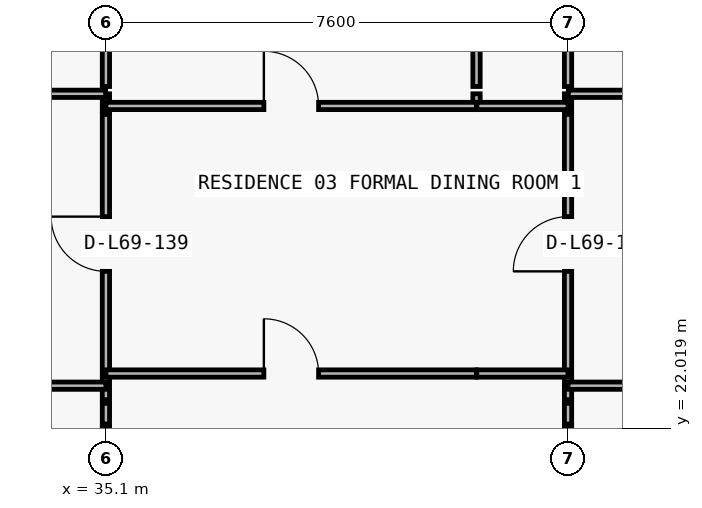
"""IFC4 building model, lengths in metres.
Left out: names, types, materials, properties, quantities, classifications, styles, units other than length and angle.
Written with IfcOpenShell. Run it as: python <this file> out.ifc"""

import sys

from ifc_helpers import new_model, si_unit, direction, frame, frame_2d, origin, place, context, subcontext, project, spatial, rectangle, extrude, element, fill, save


model = new_model("IFC4")
c1 = context("Model", 3, precision=1e-05, world=origin(), true_north=direction((0.0, 1.0)))
c2 = subcontext(c1, "Body", "Model", "MODEL_VIEW")
j1 = project(units=[si_unit("LENGTHUNIT", "METRE"), si_unit("PLANEANGLEUNIT", "RADIAN")], contexts=[c1])
p1 = place(None, origin())
s1 = spatial("IfcSite", under=j1, at=p1, CompositionType="ELEMENT")
p2 = place(p1, origin())
s2 = spatial("IfcBuilding", under=s1, at=p2, CompositionType="ELEMENT")
p3 = place(p2, frame((0.0, 0.0, 246.3)))
s3 = spatial("IfcBuildingStorey", under=s2, at=p3, CompositionType="ELEMENT", Elevation=246.3)
p4 = place(p3, frame((35.1, 22.09, 0.0), z_axis=(0.0, 0.0, 1.0), x_axis=(0.0, 1.0, 0.0)))
e1 = element("IfcWall", 1, at=p4, inside=s3, PredefinedType="PARTITIONING", context=c2, shape_type="SweptSolid", body=[
    extrude(rectangle(XDim=0.34, YDim=0.12, at=frame_2d((0.17, 0.0))), origin(), (0.0, 0.0, 1.0), 2.263),
])
p5 = place(p3, frame((35.1, 22.49, 0.0), z_axis=(0.0, 0.0, 1.0), x_axis=(0.0, 1.0, 0.0)))
e2 = element("IfcWall", 2, at=p5, inside=s3, PredefinedType="PARTITIONING", context=c2, shape_type="SweptSolid", body=[
    extrude(rectangle(XDim=4.69, YDim=0.12, at=frame_2d((2.345, 0.0))), origin(), (0.0, 0.0, 1.0), 2.263),
])
p6 = place(p5, frame((2.11, 0.0, 0.0)))
e3 = element("IfcOpeningElement", 3, at=p6, cuts=e2, PredefinedType="OPENING", context=c2, shape_type="SweptSolid", body=[
    extrude(rectangle(XDim=0.9, YDim=2.15, at=frame_2d((0.45, 1.075))), frame((0.0, 0.07, 0.0), z_axis=(0.0, -1.0, 0.0), x_axis=(1.0, 0.0, 0.0)), (0.0, 0.0, 1.0), 0.14),
])
p7 = place(p3, frame((35.1, 27.24, 0.0), z_axis=(0.0, 0.0, 1.0), x_axis=(0.0, 1.0, 0.0)))
e4 = element("IfcWall", 4, at=p7, inside=s3, PredefinedType="PARTITIONING", context=c2, shape_type="SweptSolid", body=[
    extrude(rectangle(XDim=0.28, YDim=0.12, at=frame_2d((0.14, 0.0))), origin(), (0.0, 0.0, 1.0), 2.263),
])
p8 = place(p3, frame((35.1, 27.64, 0.0), z_axis=(0.0, 0.0, 1.0), x_axis=(0.0, 1.0, 0.0)))
e5 = element("IfcWall", 5, at=p8, inside=s3, PredefinedType="PARTITIONING", context=c2, shape_type="SweptSolid", body=[
    extrude(rectangle(XDim=6.06, YDim=0.12, at=frame_2d((3.03, 0.0))), origin(), (0.0, 0.0, 1.0), 2.263),
])
p9 = place(p3, frame((41.195, 27.32, 0.0), z_axis=(0.0, 0.0, 1.0), x_axis=(0.0, 1.0, 0.0)))
e6 = element("IfcWall", 6, at=p9, inside=s3, PredefinedType="PARTITIONING", context=c2, shape_type="SweptSolid", body=[
    extrude(rectangle(XDim=0.2, YDim=0.12, at=frame_2d((0.1, 0.0))), origin(), (0.0, 0.0, 1.0), 3.05),
])
p10 = place(p3, frame((41.195, 27.64, 0.0), z_axis=(0.0, 0.0, 1.0), x_axis=(0.0, 1.0, 0.0)))
e7 = element("IfcWall", 7, at=p10, inside=s3, PredefinedType="PARTITIONING", context=c2, shape_type="SweptSolid", body=[
    extrude(rectangle(XDim=6.06, YDim=0.12, at=frame_2d((3.03, 0.0))), origin(), (0.0, 0.0, 1.0), 3.05),
])
p11 = place(p10, frame((2.605, 0.0, 0.0)))
e8 = element("IfcOpeningElement", 8, at=p11, cuts=e7, PredefinedType="OPENING", context=c2, shape_type="SweptSolid", body=[
    extrude(rectangle(XDim=0.85, YDim=2.1, at=frame_2d((0.425, 1.05))), frame((0.0, 0.07, 0.0), z_axis=(0.0, -1.0, 0.0), x_axis=(1.0, 0.0, 0.0)), (0.0, 0.0, 1.0), 0.14),
])
p12 = place(p3, frame((42.7, 22.09, 0.0), z_axis=(0.0, 0.0, 1.0), x_axis=(0.0, 1.0, 0.0)))
e9 = element("IfcWall", 9, at=p12, inside=s3, PredefinedType="PARTITIONING", context=c2, shape_type="SweptSolid", body=[
    extrude(rectangle(XDim=0.34, YDim=0.12, at=frame_2d((0.17, 0.0))), origin(), (0.0, 0.0, 1.0), 2.263),
])
p13 = place(p3, frame((42.7, 22.49, 0.0), z_axis=(0.0, 0.0, 1.0), x_axis=(0.0, 1.0, 0.0)))
e10 = element("IfcWall", 10, at=p13, inside=s3, PredefinedType="PARTITIONING", context=c2, shape_type="SweptSolid", body=[
    extrude(rectangle(XDim=4.69, YDim=0.12, at=frame_2d((2.345, 0.0))), origin(), (0.0, 0.0, 1.0), 2.263),
])
p14 = place(p13, frame((2.11, 0.0, 0.0)))
e11 = element("IfcOpeningElement", 11, at=p14, cuts=e10, PredefinedType="OPENING", context=c2, shape_type="SweptSolid", body=[
    extrude(rectangle(XDim=0.9, YDim=2.15, at=frame_2d((0.45, 1.075))), frame((0.0, 0.07, 0.0), z_axis=(0.0, -1.0, 0.0), x_axis=(1.0, 0.0, 0.0)), (0.0, 0.0, 1.0), 0.14),
])
p15 = place(p3, frame((42.7, 27.24, 0.0), z_axis=(0.0, 0.0, 1.0), x_axis=(0.0, 1.0, 0.0)))
e12 = element("IfcWall", 12, at=p15, inside=s3, PredefinedType="PARTITIONING", context=c2, shape_type="SweptSolid", body=[
    extrude(rectangle(XDim=0.28, YDim=0.12, at=frame_2d((0.14, 0.0))), origin(), (0.0, 0.0, 1.0), 2.263),
])
p16 = place(p3, frame((42.7, 27.64, 0.0), z_axis=(0.0, 0.0, 1.0), x_axis=(0.0, 1.0, 0.0)))
e13 = element("IfcWall", 13, at=p16, inside=s3, PredefinedType="PARTITIONING", context=c2, shape_type="SweptSolid", body=[
    extrude(rectangle(XDim=6.06, YDim=0.12, at=frame_2d((3.03, 0.0))), origin(), (0.0, 0.0, 1.0), 2.263),
])
p17 = place(p3, frame((26.92, 22.72, 0.0), z_axis=(0.0, 0.0, 1.0), x_axis=(1.0, 0.0, 0.0)))
e14 = element("IfcWall", 14, at=p17, inside=s3, PredefinedType="PARTITIONING", context=c2, shape_type="SweptSolid", body=[
    extrude(rectangle(XDim=8.18, YDim=0.12, at=frame_2d((4.09, 0.0))), origin(), (0.0, 0.0, 1.0), 3.05),
])
p18 = place(p17, frame((1.33, 0.0, 0.0)))
e15 = element("IfcOpeningElement", 15, at=p18, cuts=e14, PredefinedType="OPENING", context=c2, shape_type="SweptSolid", body=[
    extrude(rectangle(XDim=0.9, YDim=2.15, at=frame_2d((0.45, 1.075))), frame((0.0, 0.07, 0.0), z_axis=(0.0, -1.0, 0.0), x_axis=(1.0, 0.0, 0.0)), (0.0, 0.0, 1.0), 0.14),
])
p19 = place(p3, frame((42.7, 22.72, 0.0), z_axis=(0.0, 0.0, 1.0), x_axis=(1.0, 0.0, 0.0)))
e16 = element("IfcWall", 16, at=p19, inside=s3, PredefinedType="PARTITIONING", context=c2, shape_type="SweptSolid", body=[
    extrude(rectangle(XDim=8.18, YDim=0.12, at=frame_2d((4.09, 0.0))), origin(), (0.0, 0.0, 1.0), 3.05),
])
p20 = place(p19, frame((3.64, 0.0, 0.0)))
e17 = element("IfcOpeningElement", 17, at=p20, cuts=e16, PredefinedType="OPENING", context=c2, shape_type="SweptSolid", body=[
    extrude(rectangle(XDim=0.9, YDim=2.15, at=frame_2d((0.45, 1.075))), frame((0.0, 0.07, 0.0), z_axis=(0.0, -1.0, 0.0), x_axis=(1.0, 0.0, 0.0)), (0.0, 0.0, 1.0), 0.14),
])
p21 = place(p3, frame((35.1, 22.92, 0.0), z_axis=(0.0, 0.0, 1.0), x_axis=(1.0, 0.0, 0.0)))
e18 = element("IfcWall", 18, at=p21, inside=s3, PredefinedType="PARTITIONING", context=c2, shape_type="SweptSolid", body=[
    extrude(rectangle(XDim=6.095, YDim=0.12, at=frame_2d((3.047, 0.0))), origin(), (0.0, 0.0, 1.0), 3.05),
])
p22 = place(p21, frame((2.597, 0.0, 0.0)))
e19 = element("IfcOpeningElement", 19, at=p22, cuts=e18, PredefinedType="OPENING", context=c2, shape_type="SweptSolid", body=[
    extrude(rectangle(XDim=0.9, YDim=2.15, at=frame_2d((0.45, 1.075))), frame((0.0, 0.07, 0.0), z_axis=(0.0, -1.0, 0.0), x_axis=(1.0, 0.0, 0.0)), (0.0, 0.0, 1.0), 0.14),
])
p23 = place(p3, frame((41.2, 22.92, 0.0), z_axis=(0.0, 0.0, 1.0), x_axis=(1.0, 0.0, 0.0)))
e20 = element("IfcWall", 20, at=p23, inside=s3, PredefinedType="PARTITIONING", context=c2, shape_type="SweptSolid", body=[
    extrude(rectangle(XDim=1.5, YDim=0.12, at=frame_2d((0.75, 0.0))), origin(), (0.0, 0.0, 1.0), 3.05),
])
p24 = place(p3, frame((35.1, 27.32, 0.0), z_axis=(0.0, 0.0, 1.0), x_axis=(1.0, 0.0, 0.0)))
e21 = element("IfcWall", 21, at=p24, inside=s3, PredefinedType="PARTITIONING", context=c2, shape_type="SweptSolid", body=[
    extrude(rectangle(XDim=6.095, YDim=0.12, at=frame_2d((3.047, 0.0))), origin(), (0.0, 0.0, 1.0), 3.05),
])
p25 = place(p24, frame((2.597, 0.0, 0.0)))
e22 = element("IfcOpeningElement", 22, at=p25, cuts=e21, PredefinedType="OPENING", context=c2, shape_type="SweptSolid", body=[
    extrude(rectangle(XDim=0.9, YDim=2.15, at=frame_2d((0.45, 1.075))), frame((0.0, 0.07, 0.0), z_axis=(0.0, -1.0, 0.0), x_axis=(1.0, 0.0, 0.0)), (0.0, 0.0, 1.0), 0.14),
])
p26 = place(p3, frame((41.2, 27.32, 0.0), z_axis=(0.0, 0.0, 1.0), x_axis=(1.0, 0.0, 0.0)))
e23 = element("IfcWall", 23, at=p26, inside=s3, PredefinedType="PARTITIONING", context=c2, shape_type="SweptSolid", body=[
    extrude(rectangle(XDim=1.5, YDim=0.12, at=frame_2d((0.75, 0.0))), origin(), (0.0, 0.0, 1.0), 3.05),
])
p27 = place(p3, frame((26.92, 27.52, 0.0), z_axis=(0.0, 0.0, 1.0), x_axis=(1.0, 0.0, 0.0)))
e24 = element("IfcWall", 24, at=p27, inside=s3, PredefinedType="PARTITIONING", context=c2, shape_type="SweptSolid", body=[
    extrude(rectangle(XDim=8.175, YDim=0.12, at=frame_2d((4.087, 0.0))), origin(), (0.0, 0.0, 1.0), 3.05),
])
p28 = place(p27, frame((1.33, 0.0, 0.0)))
e25 = element("IfcOpeningElement", 25, at=p28, cuts=e24, PredefinedType="OPENING", context=c2, shape_type="SweptSolid", body=[
    extrude(rectangle(XDim=0.9, YDim=2.15, at=frame_2d((0.45, 1.075))), frame((0.0, 0.07, 0.0), z_axis=(0.0, -1.0, 0.0), x_axis=(1.0, 0.0, 0.0)), (0.0, 0.0, 1.0), 0.14),
])
p29 = place(p3, frame((42.705, 27.52, 0.0), z_axis=(0.0, 0.0, 1.0), x_axis=(1.0, 0.0, 0.0)))
e26 = element("IfcWall", 26, at=p29, inside=s3, PredefinedType="PARTITIONING", context=c2, shape_type="SweptSolid", body=[
    extrude(rectangle(XDim=8.175, YDim=0.12, at=frame_2d((4.087, 0.0))), origin(), (0.0, 0.0, 1.0), 3.05),
])
p30 = place(p29, frame((2.93, 0.0, 0.0)))
e27 = element("IfcOpeningElement", 27, at=p30, cuts=e26, PredefinedType="OPENING", context=c2, shape_type="SweptSolid", body=[
    extrude(rectangle(XDim=0.9, YDim=2.15, at=frame_2d((0.45, 1.075))), frame((0.0, 0.07, 0.0), z_axis=(0.0, -1.0, 0.0), x_axis=(1.0, 0.0, 0.0)), (0.0, 0.0, 1.0), 0.14),
])
p31 = place(p6, origin())
e28 = element("IfcDoor", 28, at=p31, inside=s3, OperationType="SINGLE_SWING_RIGHT", PredefinedType="DOOR", context=c2, shape_type="SweptSolid", body=[
    extrude(rectangle(XDim=0.9, YDim=2.15, at=frame_2d((0.45, 1.075))), frame((0.0, 0.025, 0.0), z_axis=(0.0, -1.0, 0.0), x_axis=(1.0, 0.0, 0.0)), (0.0, 0.0, 1.0), 0.05),
])
fill(e3, e28)
p32 = place(p25, origin())
e29 = element("IfcDoor", 29, at=p32, inside=s3, OperationType="SINGLE_SWING_LEFT", PredefinedType="DOOR", context=c2, shape_type="SweptSolid", body=[
    extrude(rectangle(XDim=0.9, YDim=2.15, at=frame_2d((0.45, 1.075))), frame((0.0, 0.025, 0.0), z_axis=(0.0, -1.0, 0.0), x_axis=(1.0, 0.0, 0.0)), (0.0, 0.0, 1.0), 0.05),
])
fill(e22, e29)
p33 = place(p22, origin())
e30 = element("IfcDoor", 30, at=p33, inside=s3, OperationType="SINGLE_SWING_LEFT", PredefinedType="DOOR", context=c2, shape_type="SweptSolid", body=[
    extrude(rectangle(XDim=0.9, YDim=2.15, at=frame_2d((0.45, 1.075))), frame((0.0, 0.025, 0.0), z_axis=(0.0, -1.0, 0.0), x_axis=(1.0, 0.0, 0.0)), (0.0, 0.0, 1.0), 0.05),
])
fill(e19, e30)
p34 = place(p14, origin())
e31 = element("IfcDoor", 31, at=p34, inside=s3, OperationType="SINGLE_SWING_LEFT", PredefinedType="DOOR", context=c2, shape_type="SweptSolid", body=[
    extrude(rectangle(XDim=0.9, YDim=2.15, at=frame_2d((0.45, 1.075))), frame((0.0, 0.025, 0.0), z_axis=(0.0, -1.0, 0.0), x_axis=(1.0, 0.0, 0.0)), (0.0, 0.0, 1.0), 0.05),
])
fill(e11, e31)
save(model, sys.argv[1])
